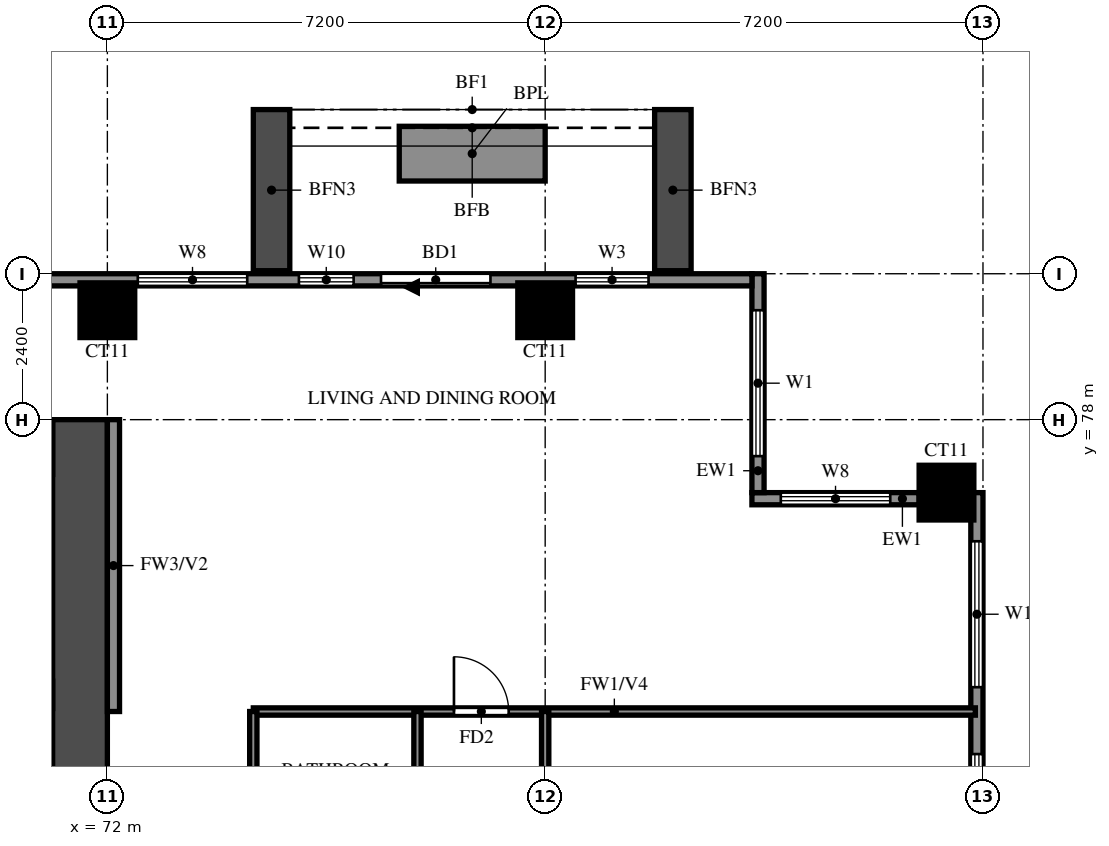
"""IFC4 building model, lengths in metres.
Left out: names, types, materials, properties, quantities, classifications, styles, units other than length and angle.
Written with IfcOpenShell. Run it as: python <this file> out.ifc"""

import sys

from ifc_helpers import new_model, si_unit, direction, frame, frame_2d, origin, origin_2d, place, context, subcontext, project, spatial, rectangle, extrude, source, transform, mapped, element, fill, save


model = new_model("IFC4")
c1 = context("Model", 3, precision=1e-05, world=origin(), true_north=direction((0.0, 1.0)))
c2 = subcontext(c1, "Body", "Model", "MODEL_VIEW")
j1 = project(units=[si_unit("LENGTHUNIT", "METRE"), si_unit("PLANEANGLEUNIT", "RADIAN")], contexts=[c1])
p1 = place(None, origin())
s1 = spatial("IfcSite", under=j1, at=p1, CompositionType="ELEMENT")
p2 = place(p1, origin())
s2 = spatial("IfcBuilding", under=s1, at=p2, CompositionType="ELEMENT")
p3 = place(p2, frame((0.0, 0.0, 97.0)))
s3 = spatial("IfcBuildingStorey", under=s2, at=p3, CompositionType="ELEMENT", Elevation=97.0)
m1 = source(origin(), c2, "Body", "SweptSolid", [
    extrude(rectangle(XDim=0.9, YDim=0.9, at=origin_2d()), origin(), (0.0, 0.0, 1.0), 3.18),
])
for number, where, z_axis, x_axis in (
    (1, (85.8, 76.8, 0.0), (0.0, 0.0, 1.0), (1.0, 0.0, 0.0)),
    (2, (72.0, 79.8, 0.0), (0.0, 0.0, 1.0), (1.0, 0.0, 0.0)),
    (3, (79.2, 79.8, 0.0), (0.0, 0.0, 1.0), (1.0, 0.0, 0.0)),
):
    element("IfcColumn", number, at=place(p3, frame(where, z_axis=z_axis, x_axis=x_axis)), inside=s3, PredefinedType="COLUMN", context=c2, shape_type="MappedRepresentation", body=[
        mapped(m1, transform((0.0, 0.0, 0.0))),
    ])
p4 = place(p3, frame((71.55, 66.0, 0.0), z_axis=(0.0, 0.0, 1.0), x_axis=(0.0, 1.0, 0.0)))
e4 = element("IfcWall", 4, at=p4, inside=s3, PredefinedType="SHEAR", context=c2, shape_type="SweptSolid", body=[
    extrude(rectangle(XDim=12.0, YDim=0.9, at=frame_2d((6.0, 0.0))), origin(), (0.0, 0.0, 1.0), 3.18),
])
p5 = place(p3, frame((29.7, 77.55, 0.0), z_axis=(0.0, 0.0, 1.0), x_axis=(1.0, 0.0, 0.0)))
e5 = element("IfcWall", 5, at=p5, inside=s3, PredefinedType="SHEAR", context=c2, shape_type="SweptSolid", body=[
    extrude(rectangle(XDim=41.4, YDim=0.9, at=frame_2d((20.7, 0.0))), origin(), (0.0, 0.0, 1.0), 3.18),
])
p6 = place(p3, frame((86.3, 69.6, 0.0), z_axis=(0.0, 0.0, 1.0), x_axis=(0.0, 1.0, 0.0)))
e6 = element("IfcWall", 6, at=p6, inside=s3, PredefinedType="SOLIDWALL", context=c2, shape_type="SweptSolid", body=[
    extrude(rectangle(XDim=7.2, YDim=0.2, at=frame_2d((3.6, 0.0))), origin(), (0.0, 0.0, 1.0), 3.18),
])
p7 = place(p6, frame((1.1, 0.0, 0.6)))
e7 = element("IfcOpeningElement", 7, at=p7, cuts=e6, PredefinedType="OPENING", context=c2, shape_type="SweptSolid", body=[
    extrude(rectangle(XDim=1.8, YDim=2.4, at=frame_2d((0.9, 1.2))), frame((0.0, 0.11, 0.0), z_axis=(0.0, -1.0, 0.0), x_axis=(1.0, 0.0, 0.0)), (0.0, 0.0, 1.0), 0.22),
])
p8 = place(p6, frame((4.0, 0.0, 0.6)))
e8 = element("IfcOpeningElement", 8, at=p8, cuts=e6, PredefinedType="OPENING", context=c2, shape_type="SweptSolid", body=[
    extrude(rectangle(XDim=2.4, YDim=2.4, at=frame_2d((1.2, 1.2))), frame((0.0, 0.11, 0.0), z_axis=(0.0, -1.0, 0.0), x_axis=(1.0, 0.0, 0.0)), (0.0, 0.0, 1.0), 0.22),
])
p9 = place(p3, frame((85.35, 76.7, 0.0), z_axis=(0.0, 0.0, 1.0), x_axis=(-1.0, 0.0, 0.0)))
e9 = element("IfcWall", 9, at=p9, inside=s3, PredefinedType="SOLIDWALL", context=c2, shape_type="SweptSolid", body=[
    extrude(rectangle(XDim=2.75, YDim=0.2, at=frame_2d((1.375, 0.0))), origin(), (0.0, 0.0, 1.0), 3.18),
])
p10 = place(p9, frame((0.475, 0.0, 0.6)))
e10 = element("IfcOpeningElement", 10, at=p10, cuts=e9, PredefinedType="OPENING", context=c2, shape_type="SweptSolid", body=[
    extrude(rectangle(XDim=1.8, YDim=2.4, at=frame_2d((0.9, 1.2))), frame((0.0, 0.11, 0.0), z_axis=(0.0, -1.0, 0.0), x_axis=(1.0, 0.0, 0.0)), (0.0, 0.0, 1.0), 0.22),
])
p11 = place(p3, frame((82.7, 76.8, 0.0), z_axis=(0.0, 0.0, 1.0), x_axis=(0.0, 1.0, 0.0)))
e11 = element("IfcWall", 11, at=p11, inside=s3, PredefinedType="SOLIDWALL", context=c2, shape_type="SweptSolid", body=[
    extrude(rectangle(XDim=3.6, YDim=0.2, at=frame_2d((1.8, 0.0))), origin(), (0.0, 0.0, 1.0), 3.18),
])
p12 = place(p11, frame((0.6, 0.0, 0.6)))
e12 = element("IfcOpeningElement", 12, at=p12, cuts=e11, PredefinedType="OPENING", context=c2, shape_type="SweptSolid", body=[
    extrude(rectangle(XDim=2.4, YDim=2.4, at=frame_2d((1.2, 1.2))), frame((0.0, 0.11, 0.0), z_axis=(0.0, -1.0, 0.0), x_axis=(1.0, 0.0, 0.0)), (0.0, 0.0, 1.0), 0.22),
])
p13 = place(p3, frame((82.6, 80.3, 0.0), z_axis=(0.0, 0.0, 1.0), x_axis=(-1.0, 0.0, 0.0)))
e13 = element("IfcWall", 13, at=p13, inside=s3, PredefinedType="SOLIDWALL", context=c2, shape_type="SweptSolid", body=[
    extrude(rectangle(XDim=64.6, YDim=0.2, at=frame_2d((32.3, 0.0))), origin(), (0.0, 0.0, 1.0), 3.18),
])
p14 = place(p13, frame((4.3, 0.0, 0.0)))
e14 = element("IfcOpeningElement", 14, at=p14, cuts=e13, PredefinedType="OPENING", context=c2, shape_type="SweptSolid", body=[
    extrude(rectangle(XDim=1.8, YDim=2.4, at=frame_2d((0.9, 1.2))), frame((0.0, 0.11, 0.0), z_axis=(0.0, -1.0, 0.0), x_axis=(1.0, 0.0, 0.0)), (0.0, 0.0, 1.0), 0.22),
])
p15 = place(p13, frame((54.767, 0.0, 0.6)))
e15 = element("IfcOpeningElement", 15, at=p15, cuts=e13, PredefinedType="OPENING", context=c2, shape_type="SweptSolid", body=[
    extrude(rectangle(XDim=2.4, YDim=2.4, at=frame_2d((1.2, 1.2))), frame((0.0, 0.11, 0.0), z_axis=(0.0, -1.0, 0.0), x_axis=(1.0, 0.0, 0.0)), (0.0, 0.0, 1.0), 0.22),
])
p16 = place(p13, frame((57.633, 0.0, 0.6)))
e16 = element("IfcOpeningElement", 16, at=p16, cuts=e13, PredefinedType="OPENING", context=c2, shape_type="SweptSolid", body=[
    extrude(rectangle(XDim=2.4, YDim=2.4, at=frame_2d((1.2, 1.2))), frame((0.0, 0.11, 0.0), z_axis=(0.0, -1.0, 0.0), x_axis=(1.0, 0.0, 0.0)), (0.0, 0.0, 1.0), 0.22),
])
p17 = place(p13, frame((62.0, 0.0, 0.6)))
e17 = element("IfcOpeningElement", 17, at=p17, cuts=e13, PredefinedType="OPENING", context=c2, shape_type="SweptSolid", body=[
    extrude(rectangle(XDim=1.8, YDim=2.4, at=frame_2d((0.9, 1.2))), frame((0.0, 0.11, 0.0), z_axis=(0.0, -1.0, 0.0), x_axis=(1.0, 0.0, 0.0)), (0.0, 0.0, 1.0), 0.22),
])
p18 = place(p13, frame((1.7, 0.0, 0.6)))
e18 = element("IfcOpeningElement", 18, at=p18, cuts=e13, PredefinedType="OPENING", context=c2, shape_type="SweptSolid", body=[
    extrude(rectangle(XDim=1.2, YDim=2.4, at=frame_2d((0.6, 1.2))), frame((0.0, 0.11, 0.0), z_axis=(0.0, -1.0, 0.0), x_axis=(1.0, 0.0, 0.0)), (0.0, 0.0, 1.0), 0.22),
])
p19 = place(p13, frame((6.55, 0.0, 0.6)))
e19 = element("IfcOpeningElement", 19, at=p19, cuts=e13, PredefinedType="OPENING", context=c2, shape_type="SweptSolid", body=[
    extrude(rectangle(XDim=0.9, YDim=2.4, at=frame_2d((0.45, 1.2))), frame((0.0, 0.11, 0.0), z_axis=(0.0, -1.0, 0.0), x_axis=(1.0, 0.0, 0.0)), (0.0, 0.0, 1.0), 0.22),
])
p20 = place(p13, frame((8.3, 0.0, 0.6)))
e20 = element("IfcOpeningElement", 20, at=p20, cuts=e13, PredefinedType="OPENING", context=c2, shape_type="SweptSolid", body=[
    extrude(rectangle(XDim=1.8, YDim=2.4, at=frame_2d((0.9, 1.2))), frame((0.0, 0.11, 0.0), z_axis=(0.0, -1.0, 0.0), x_axis=(1.0, 0.0, 0.0)), (0.0, 0.0, 1.0), 0.22),
])
for number, where, z_axis, x_axis in (
    (21, (81.3, 80.45, 0.0), (0.0, 0.0, 1.0), (0.0, 1.0, 0.0)),
    (22, (74.7, 80.45, 0.0), (0.0, 0.0, 1.0), (0.0, 1.0, 0.0)),
):
    element("IfcWall", number, at=place(p3, frame(where, z_axis=z_axis, x_axis=x_axis)), inside=s3, PredefinedType="SOLIDWALL", context=c2, shape_type="SweptSolid", body=[
        extrude(rectangle(XDim=2.65, YDim=0.6, at=frame_2d((1.325, 0.0))), origin(), (0.0, 0.0, 1.0), 2.85),
    ])
p21 = place(p3, frame((79.2, 82.375, 0.0), z_axis=(0.0, 0.0, 1.0), x_axis=(-1.0, 0.0, 0.0)))
e23 = element("IfcWall", 23, at=p21, inside=s3, PredefinedType="SOLIDWALL", context=c2, shape_type="SweptSolid", body=[
    extrude(rectangle(XDim=2.4, YDim=0.9, at=frame_2d((1.2, 0.0))), origin(), (0.0, 0.0, 1.0), 0.9),
])
p22 = place(p3, frame((72.1, 73.2, 0.0), z_axis=(0.0, 0.0, 1.0), x_axis=(0.0, 1.0, 0.0)))
e24 = element("IfcWall", 24, at=p22, inside=s3, PredefinedType="SOLIDWALL", context=c2, shape_type="SweptSolid", body=[
    extrude(rectangle(XDim=4.8, YDim=0.2, at=frame_2d((2.4, 0.0))), origin(), (0.0, 0.0, 1.0), 3.18),
])
p23 = place(p3, frame((74.4, 73.2, 0.0), z_axis=(0.0, 0.0, 1.0), x_axis=(1.0, 0.0, 0.0)))
e25 = element("IfcWall", 25, at=p23, inside=s3, PredefinedType="PARTITIONING", context=c2, shape_type="SweptSolid", body=[
    extrude(rectangle(XDim=11.875, YDim=0.12, at=frame_2d((5.938, 0.0))), origin(), (0.0, 0.0, 1.0), 2.28),
])
p24 = place(p23, frame((3.3, 0.0, 0.0)))
e26 = element("IfcOpeningElement", 26, at=p24, cuts=e25, PredefinedType="OPENING", context=c2, shape_type="SweptSolid", body=[
    extrude(rectangle(XDim=0.9, YDim=2.1, at=frame_2d((0.45, 1.05))), frame((0.0, 0.07, 0.0), z_axis=(0.0, -1.0, 0.0), x_axis=(1.0, 0.0, 0.0)), (0.0, 0.0, 1.0), 0.14),
])
p25 = place(p3, frame((74.4, 69.2, 0.0), z_axis=(0.0, 0.0, 1.0), x_axis=(0.0, 1.0, 0.0)))
e27 = element("IfcWall", 27, at=p25, inside=s3, PredefinedType="PARTITIONING", context=c2, shape_type="SweptSolid", body=[
    extrude(rectangle(XDim=4.0, YDim=0.12, at=frame_2d((2.0, 0.0))), origin(), (0.0, 0.0, 1.0), 3.18),
])
p26 = place(p3, frame((77.1, 61.2, 0.0), z_axis=(0.0, 0.0, 1.0), x_axis=(0.0, 1.0, 0.0)))
e28 = element("IfcWall", 28, at=p26, inside=s3, PredefinedType="PARTITIONING", context=c2, shape_type="SweptSolid", body=[
    extrude(rectangle(XDim=12.0, YDim=0.12, at=frame_2d((6.0, 0.0))), origin(), (0.0, 0.0, 1.0), 3.18),
])
p27 = place(p26, frame((1.875, 0.0, 0.0)))
e29 = element("IfcOpeningElement", 29, at=p27, cuts=e28, PredefinedType="OPENING", context=c2, shape_type="SweptSolid", body=[
    extrude(rectangle(XDim=0.9, YDim=2.1, at=frame_2d((0.45, 1.05))), frame((0.0, 0.07, 0.0), z_axis=(0.0, -1.0, 0.0), x_axis=(1.0, 0.0, 0.0)), (0.0, 0.0, 1.0), 0.14),
])
p28 = place(p26, frame((5.875, 0.0, 0.0)))
e30 = element("IfcOpeningElement", 30, at=p28, cuts=e28, PredefinedType="OPENING", context=c2, shape_type="SweptSolid", body=[
    extrude(rectangle(XDim=0.9, YDim=2.1, at=frame_2d((0.45, 1.05))), frame((0.0, 0.07, 0.0), z_axis=(0.0, -1.0, 0.0), x_axis=(1.0, 0.0, 0.0)), (0.0, 0.0, 1.0), 0.14),
])
p29 = place(p26, frame((9.6, 0.0, 0.0)))
e31 = element("IfcOpeningElement", 31, at=p29, cuts=e28, PredefinedType="OPENING", context=c2, shape_type="SweptSolid", body=[
    extrude(rectangle(XDim=0.8, YDim=2.1, at=frame_2d((0.4, 1.05))), frame((0.0, 0.07, 0.0), z_axis=(0.0, -1.0, 0.0), x_axis=(1.0, 0.0, 0.0)), (0.0, 0.0, 1.0), 0.14),
])
p30 = place(p3, frame((79.2, 66.0, 0.0), z_axis=(0.0, 0.0, 1.0), x_axis=(0.0, 1.0, 0.0)))
e32 = element("IfcWall", 32, at=p30, inside=s3, PredefinedType="PARTITIONING", context=c2, shape_type="SweptSolid", body=[
    extrude(rectangle(XDim=7.2, YDim=0.12, at=frame_2d((3.6, 0.0))), origin(), (0.0, 0.0, 1.0), 3.18),
])
p31 = place(p30, frame((1.35, 0.0, 0.0)))
e33 = element("IfcOpeningElement", 33, at=p31, cuts=e32, PredefinedType="OPENING", context=c2, shape_type="SweptSolid", body=[
    extrude(rectangle(XDim=0.9, YDim=2.1, at=frame_2d((0.45, 1.05))), frame((0.0, 0.07, 0.0), z_axis=(0.0, -1.0, 0.0), x_axis=(1.0, 0.0, 0.0)), (0.0, 0.0, 1.0), 0.14),
])
p32 = place(p30, frame((4.95, 0.0, 0.0)))
e34 = element("IfcOpeningElement", 34, at=p32, cuts=e32, PredefinedType="OPENING", context=c2, shape_type="SweptSolid", body=[
    extrude(rectangle(XDim=0.9, YDim=2.1, at=frame_2d((0.45, 1.05))), frame((0.0, 0.07, 0.0), z_axis=(0.0, -1.0, 0.0), x_axis=(1.0, 0.0, 0.0)), (0.0, 0.0, 1.0), 0.14),
])
p33 = place(p7, origin())
e35 = element("IfcWindow", 35, at=p33, inside=s3, PartitioningType="DOUBLE_PANEL_VERTICAL", PredefinedType="WINDOW", context=c2, shape_type="SweptSolid", body=[
    extrude(rectangle(XDim=1.8, YDim=2.4, at=frame_2d((0.9, 1.2))), frame((0.0, 0.03, 0.0), z_axis=(0.0, -1.0, 0.0), x_axis=(1.0, 0.0, 0.0)), (0.0, 0.0, 1.0), 0.06),
])
fill(e7, e35)
p34 = place(p8, origin())
e36 = element("IfcWindow", 36, at=p34, inside=s3, PartitioningType="DOUBLE_PANEL_VERTICAL", PredefinedType="WINDOW", context=c2, shape_type="SweptSolid", body=[
    extrude(rectangle(XDim=2.4, YDim=2.4, at=frame_2d((1.2, 1.2))), frame((0.0, 0.03, 0.0), z_axis=(0.0, -1.0, 0.0), x_axis=(1.0, 0.0, 0.0)), (0.0, 0.0, 1.0), 0.06),
])
fill(e8, e36)
p35 = place(p10, origin())
e37 = element("IfcWindow", 37, at=p35, inside=s3, PartitioningType="DOUBLE_PANEL_VERTICAL", PredefinedType="WINDOW", context=c2, shape_type="SweptSolid", body=[
    extrude(rectangle(XDim=1.8, YDim=2.4, at=frame_2d((0.9, 1.2))), frame((0.0, 0.03, 0.0), z_axis=(0.0, -1.0, 0.0), x_axis=(1.0, 0.0, 0.0)), (0.0, 0.0, 1.0), 0.06),
])
fill(e10, e37)
p36 = place(p12, origin())
e38 = element("IfcWindow", 38, at=p36, inside=s3, PartitioningType="DOUBLE_PANEL_VERTICAL", PredefinedType="WINDOW", context=c2, shape_type="SweptSolid", body=[
    extrude(rectangle(XDim=2.4, YDim=2.4, at=frame_2d((1.2, 1.2))), frame((0.0, 0.03, 0.0), z_axis=(0.0, -1.0, 0.0), x_axis=(1.0, 0.0, 0.0)), (0.0, 0.0, 1.0), 0.06),
])
fill(e12, e38)
p37 = place(p14, origin())
e39 = element("IfcDoor", 39, at=p37, inside=s3, OperationType="DOUBLE_DOOR_SLIDING", PredefinedType="DOOR", context=c2, shape_type="SweptSolid", body=[
    extrude(rectangle(XDim=1.8, YDim=2.4, at=frame_2d((0.9, 1.2))), frame((0.0, 0.025, 0.0), z_axis=(0.0, -1.0, 0.0), x_axis=(1.0, 0.0, 0.0)), (0.0, 0.0, 1.0), 0.05),
])
fill(e14, e39)
p38 = place(p18, origin())
e40 = element("IfcWindow", 40, at=p38, inside=s3, PartitioningType="SINGLE_PANEL", PredefinedType="WINDOW", context=c2, shape_type="SweptSolid", body=[
    extrude(rectangle(XDim=1.2, YDim=2.4, at=frame_2d((0.6, 1.2))), frame((0.0, 0.03, 0.0), z_axis=(0.0, -1.0, 0.0), x_axis=(1.0, 0.0, 0.0)), (0.0, 0.0, 1.0), 0.06),
])
fill(e18, e40)
p39 = place(p19, origin())
e41 = element("IfcWindow", 41, at=p39, inside=s3, PartitioningType="SINGLE_PANEL", PredefinedType="WINDOW", context=c2, shape_type="SweptSolid", body=[
    extrude(rectangle(XDim=0.9, YDim=2.4, at=frame_2d((0.45, 1.2))), frame((0.0, 0.03, 0.0), z_axis=(0.0, -1.0, 0.0), x_axis=(1.0, 0.0, 0.0)), (0.0, 0.0, 1.0), 0.06),
])
fill(e19, e41)
p40 = place(p20, origin())
e42 = element("IfcWindow", 42, at=p40, inside=s3, PartitioningType="DOUBLE_PANEL_VERTICAL", PredefinedType="WINDOW", context=c2, shape_type="SweptSolid", body=[
    extrude(rectangle(XDim=1.8, YDim=2.4, at=frame_2d((0.9, 1.2))), frame((0.0, 0.03, 0.0), z_axis=(0.0, -1.0, 0.0), x_axis=(1.0, 0.0, 0.0)), (0.0, 0.0, 1.0), 0.06),
])
fill(e20, e42)
p41 = place(p24, origin())
e43 = element("IfcDoor", 43, at=p41, inside=s3, OperationType="SINGLE_SWING_LEFT", PredefinedType="DOOR", context=c2, shape_type="SweptSolid", body=[
    extrude(rectangle(XDim=0.9, YDim=2.1, at=frame_2d((0.45, 1.05))), frame((0.0, 0.025, 0.0), z_axis=(0.0, -1.0, 0.0), x_axis=(1.0, 0.0, 0.0)), (0.0, 0.0, 1.0), 0.05),
])
fill(e26, e43)
save(model, sys.argv[1])
